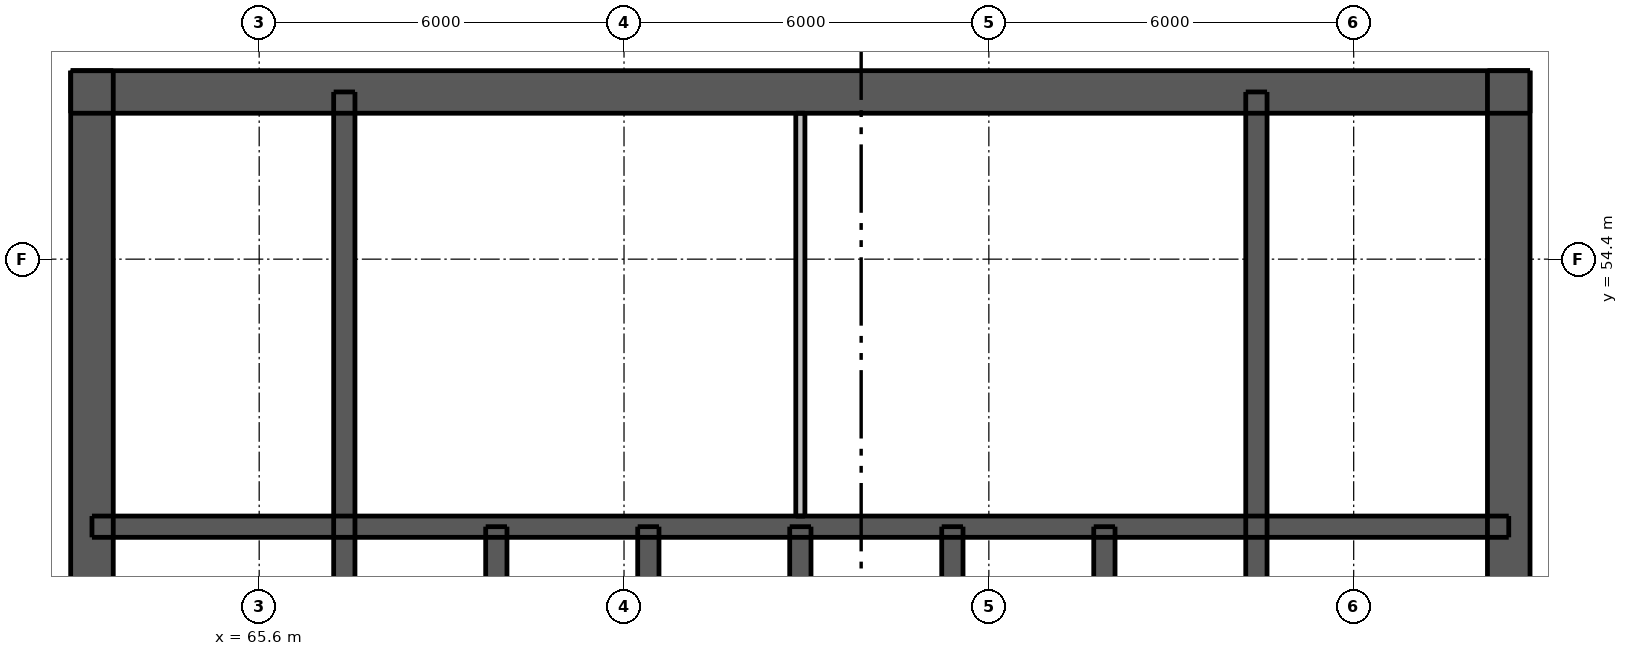
"""IFC4 building model, lengths in metres.
Left out: names, types, materials, properties, quantities, classifications, styles, units other than length and angle.
Written with IfcOpenShell. Run it as: python <this file> out.ifc"""

import sys

from ifc_helpers import new_model, si_unit, direction, frame, frame_2d, origin, place, context, subcontext, project, spatial, rectangle, extrude, element, fill, save


model = new_model("IFC4")
c1 = context("Model", 3, precision=1e-05, world=origin(), true_north=direction((0.0, 1.0)))
c2 = subcontext(c1, "Body", "Model", "MODEL_VIEW")
j1 = project(units=[si_unit("LENGTHUNIT", "METRE"), si_unit("PLANEANGLEUNIT", "RADIAN")], contexts=[c1])
p1 = place(None, origin())
s1 = spatial("IfcSite", under=j1, at=p1, CompositionType="ELEMENT")
p2 = place(p1, origin())
s2 = spatial("IfcBuilding", under=s1, at=p2, CompositionType="ELEMENT")
p3 = place(p2, frame((0.0, 0.0, 174.7)))
s3 = spatial("IfcBuildingStorey", under=s2, at=p3, CompositionType="ELEMENT", Elevation=174.7)
p4 = place(p3, frame((62.5, 57.15, 0.0), z_axis=(0.0, 0.0, 1.0), x_axis=(1.0, 0.0, 0.0)))
e1 = element("IfcWall", 1, at=p4, inside=s3, PredefinedType="SHEAR", context=c2, shape_type="SweptSolid", body=[
    extrude(rectangle(XDim=24.0, YDim=0.7, at=frame_2d((12.0, 0.0))), origin(), (0.0, 0.0, 1.0), 2.95),
])
p5 = place(p4, frame((20.938, 0.0, 0.0)))
e2 = element("IfcOpeningElement", 2, at=p5, cuts=e1, PredefinedType="OPENING", context=c2, shape_type="SweptSolid", body=[
    extrude(rectangle(XDim=1.1, YDim=2.1, at=frame_2d((0.55, 1.05))), frame((0.0, 0.36, 0.0), z_axis=(0.0, -1.0, 0.0), x_axis=(1.0, 0.0, 0.0)), (0.0, 0.0, 1.0), 0.72),
])
p6 = place(p4, frame((1.962, 0.0, 0.0)))
e3 = element("IfcOpeningElement", 3, at=p6, cuts=e1, PredefinedType="OPENING", context=c2, shape_type="SweptSolid", body=[
    extrude(rectangle(XDim=1.1, YDim=2.1, at=frame_2d((0.55, 1.05))), frame((0.0, 0.36, 0.0), z_axis=(0.0, -1.0, 0.0), x_axis=(1.0, 0.0, 0.0)), (0.0, 0.0, 1.0), 0.72),
])
p7 = place(p4, frame((7.887, 0.0, 0.0)))
e4 = element("IfcOpeningElement", 4, at=p7, cuts=e1, PredefinedType="OPENING", context=c2, shape_type="SweptSolid", body=[
    extrude(rectangle(XDim=0.9, YDim=2.1, at=frame_2d((0.45, 1.05))), frame((0.0, 0.36, 0.0), z_axis=(0.0, -1.0, 0.0), x_axis=(1.0, 0.0, 0.0)), (0.0, 0.0, 1.0), 0.72),
])
p8 = place(p4, frame((15.212, 0.0, 0.0)))
e5 = element("IfcOpeningElement", 5, at=p8, cuts=e1, PredefinedType="OPENING", context=c2, shape_type="SweptSolid", body=[
    extrude(rectangle(XDim=0.9, YDim=2.1, at=frame_2d((0.45, 1.05))), frame((0.0, 0.36, 0.0), z_axis=(0.0, -1.0, 0.0), x_axis=(1.0, 0.0, 0.0)), (0.0, 0.0, 1.0), 0.72),
])
p9 = place(p3, frame((62.85, 33.5, 0.0), z_axis=(0.0, 0.0, 1.0), x_axis=(0.0, 1.0, 0.0)))
e6 = element("IfcWall", 6, at=p9, inside=s3, PredefinedType="SHEAR", context=c2, shape_type="SweptSolid", body=[
    extrude(rectangle(XDim=24.0, YDim=0.7, at=frame_2d((12.0, 0.0))), origin(), (0.0, 0.0, 1.0), 2.95),
])
p10 = place(p9, frame((11.2, 0.0, 0.0)))
e7 = element("IfcOpeningElement", 7, at=p10, cuts=e6, PredefinedType="OPENING", context=c2, shape_type="SweptSolid", body=[
    extrude(rectangle(XDim=1.6, YDim=2.1, at=frame_2d((0.8, 1.05))), frame((0.0, 0.36, 0.0), z_axis=(0.0, -1.0, 0.0), x_axis=(1.0, 0.0, 0.0)), (0.0, 0.0, 1.0), 0.72),
])
p11 = place(p3, frame((86.15, 33.5, 0.0), z_axis=(0.0, 0.0, 1.0), x_axis=(0.0, 1.0, 0.0)))
e8 = element("IfcWall", 8, at=p11, inside=s3, PredefinedType="SHEAR", context=c2, shape_type="SweptSolid", body=[
    extrude(rectangle(XDim=24.0, YDim=0.7, at=frame_2d((12.0, 0.0))), origin(), (0.0, 0.0, 1.0), 2.95),
])
p12 = place(p11, frame((11.2, 0.0, 0.0)))
e9 = element("IfcOpeningElement", 9, at=p12, cuts=e8, PredefinedType="OPENING", context=c2, shape_type="SweptSolid", body=[
    extrude(rectangle(XDim=1.6, YDim=2.1, at=frame_2d((0.8, 1.05))), frame((0.0, 0.36, 0.0), z_axis=(0.0, -1.0, 0.0), x_axis=(1.0, 0.0, 0.0)), (0.0, 0.0, 1.0), 0.72),
])
p13 = place(p3, frame((62.85, 50.0, 0.0), z_axis=(0.0, 0.0, 1.0), x_axis=(1.0, 0.0, 0.0)))
e10 = element("IfcWall", 10, at=p13, inside=s3, PredefinedType="SHEAR", context=c2, shape_type="SweptSolid", body=[
    extrude(rectangle(XDim=23.3, YDim=0.35, at=frame_2d((11.65, 0.0))), origin(), (0.0, 0.0, 1.0), 2.95),
])
for number, where, z_axis, x_axis in (
    (11, (67.0, 47.1, 0.0), (0.0, 0.0, 1.0), (0.0, 1.0, 0.0)),
    (12, (82.0, 47.1, 0.0), (0.0, 0.0, 1.0), (0.0, 1.0, 0.0)),
):
    element("IfcWall", number, at=place(p3, frame(where, z_axis=z_axis, x_axis=x_axis)), inside=s3, PredefinedType="SHEAR", context=c2, shape_type="SweptSolid", body=[
        extrude(rectangle(XDim=10.05, YDim=0.35, at=frame_2d((5.025, 0.0))), origin(), (0.0, 0.0, 1.0), 2.95),
    ])
for number, where, z_axis, x_axis in (
    (13, (69.5, 47.1, 0.0), (0.0, 0.0, 1.0), (0.0, 1.0, 0.0)),
    (14, (72.0, 47.1, 0.0), (0.0, 0.0, 1.0), (0.0, 1.0, 0.0)),
    (15, (74.5, 47.1, 0.0), (0.0, 0.0, 1.0), (0.0, 1.0, 0.0)),
    (16, (77.0, 47.1, 0.0), (0.0, 0.0, 1.0), (0.0, 1.0, 0.0)),
    (17, (79.5, 47.1, 0.0), (0.0, 0.0, 1.0), (0.0, 1.0, 0.0)),
):
    element("IfcWall", number, at=place(p3, frame(where, z_axis=z_axis, x_axis=x_axis)), inside=s3, PredefinedType="SHEAR", context=c2, shape_type="SweptSolid", body=[
        extrude(rectangle(XDim=2.9, YDim=0.35, at=frame_2d((1.45, 0.0))), origin(), (0.0, 0.0, 1.0), 2.95),
    ])
p14 = place(p3, frame((74.5, 50.175, 0.0), z_axis=(0.0, 0.0, 1.0), x_axis=(0.0, 1.0, 0.0)))
e18 = element("IfcWall", 18, at=p14, inside=s3, PredefinedType="PLUMBINGWALL", context=c2, shape_type="SweptSolid", body=[
    extrude(rectangle(XDim=6.625, YDim=0.15, at=frame_2d((3.312, 0.0))), origin(), (0.0, 0.0, 1.0), 2.95),
])
p15 = place(p5, origin())
e19 = element("IfcDoor", 19, at=p15, inside=s3, OperationType="SINGLE_SWING_RIGHT", PredefinedType="DOOR", context=c2, shape_type="SweptSolid", body=[
    extrude(rectangle(XDim=1.1, YDim=2.1, at=frame_2d((0.55, 1.05))), frame((0.0, -0.288, 0.0), z_axis=(0.0, -1.0, 0.0), x_axis=(1.0, 0.0, 0.0)), (0.0, 0.0, 1.0), 0.05),
])
fill(e2, e19)
p16 = place(p6, origin())
e20 = element("IfcDoor", 20, at=p16, inside=s3, OperationType="SINGLE_SWING_LEFT", PredefinedType="DOOR", context=c2, shape_type="SweptSolid", body=[
    extrude(rectangle(XDim=1.1, YDim=2.1, at=frame_2d((0.55, 1.05))), frame((0.0, -0.288, 0.0), z_axis=(0.0, -1.0, 0.0), x_axis=(1.0, 0.0, 0.0)), (0.0, 0.0, 1.0), 0.05),
])
fill(e3, e20)
p17 = place(p7, origin())
e21 = element("IfcDoor", 21, at=p17, inside=s3, OperationType="SINGLE_SWING_RIGHT", PredefinedType="DOOR", context=c2, shape_type="SweptSolid", body=[
    extrude(rectangle(XDim=0.9, YDim=2.1, at=frame_2d((0.45, 1.05))), frame((0.0, -0.288, 0.0), z_axis=(0.0, -1.0, 0.0), x_axis=(1.0, 0.0, 0.0)), (0.0, 0.0, 1.0), 0.05),
])
fill(e4, e21)
p18 = place(p8, origin())
e22 = element("IfcDoor", 22, at=p18, inside=s3, OperationType="SINGLE_SWING_RIGHT", PredefinedType="DOOR", context=c2, shape_type="SweptSolid", body=[
    extrude(rectangle(XDim=0.9, YDim=2.1, at=frame_2d((0.45, 1.05))), frame((0.0, -0.288, 0.0), z_axis=(0.0, -1.0, 0.0), x_axis=(1.0, 0.0, 0.0)), (0.0, 0.0, 1.0), 0.05),
])
fill(e5, e22)
save(model, sys.argv[1])
